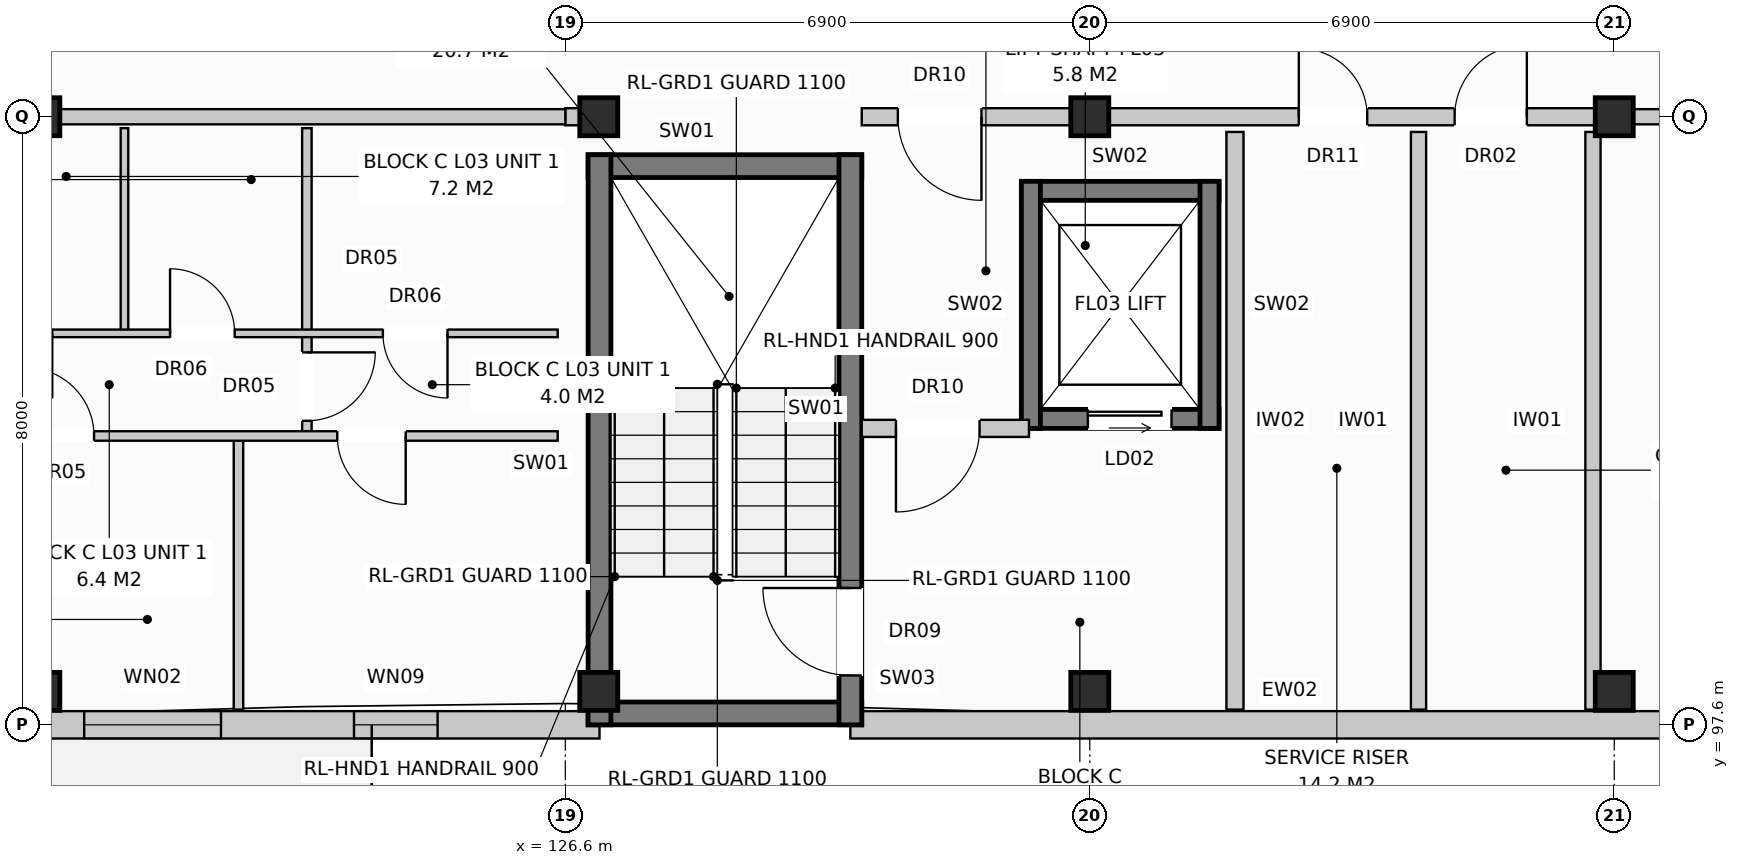
"""IFC4 building model, lengths in metres.
Left out: names, types, materials, properties, quantities, classifications, styles, units other than length and angle.
Written with IfcOpenShell. Run it as: python <this file> out.ifc"""

import sys

from ifc_helpers import new_model, si_unit, direction, frame, frame_2d, origin, origin_with_axes, origin_2d, place, context, subcontext, project, spatial, rectangle, extrude, element, fill, save


model = new_model("IFC4")
c1 = context("Model", 3, precision=1e-05, world=origin(), true_north=direction((0.0, 1.0)))
c2 = subcontext(c1, "Body", "Model", "MODEL_VIEW")
j1 = project(units=[si_unit("LENGTHUNIT", "METRE"), si_unit("PLANEANGLEUNIT", "RADIAN")], contexts=[c1])
p1 = place(None, origin())
s1 = spatial("IfcSite", under=j1, at=p1, CompositionType="ELEMENT")
p2 = place(p1, origin())
s2 = spatial("IfcBuilding", under=s1, at=p2, CompositionType="ELEMENT")
p3 = place(p2, frame((0.0, 0.0, 11.2)))
s3 = spatial("IfcBuildingStorey", under=s2, at=p3, CompositionType="ELEMENT", Elevation=11.2)
for number, where, z_axis, x_axis in (
    (1, (119.7, 98.04, 0.0), (0.0, 0.0, 1.0), (1.0, 0.0, 0.0)),
    (2, (119.7, 105.6, 0.0), (0.0, 0.0, 1.0), (1.0, 0.0, 0.0)),
    (3, (127.04, 98.04, 0.0), (0.0, 0.0, 1.0), (1.0, 0.0, 0.0)),
    (4, (127.04, 105.6, 0.0), (0.0, 0.0, 1.0), (1.0, 0.0, 0.0)),
    (5, (133.5, 98.04, 0.0), (0.0, 0.0, 1.0), (1.0, 0.0, 0.0)),
    (6, (133.5, 105.6, 0.0), (0.0, 0.0, 1.0), (1.0, 0.0, 0.0)),
    (7, (140.4, 98.04, 0.0), (0.0, 0.0, 1.0), (1.0, 0.0, 0.0)),
    (8, (140.4, 105.6, 0.0), (0.0, 0.0, 1.0), (1.0, 0.0, 0.0)),
):
    element("IfcColumn", number, at=place(p3, frame(where, z_axis=z_axis, x_axis=x_axis)), inside=s3, PredefinedType="COLUMN", context=c2, shape_type="SweptSolid", body=[
        extrude(rectangle(XDim=0.5, YDim=0.5, at=origin_2d()), origin(), (0.0, 0.0, 1.0), 3.2),
    ])
p4 = place(p3, frame((112.97, 97.6, 0.0), z_axis=(0.0, 0.0, 1.0), x_axis=(1.0, 0.0, 0.0)))
e9 = element("IfcWall", 9, at=p4, inside=s3, PredefinedType="STANDARD", context=c2, shape_type="SweptSolid", body=[
    extrude(rectangle(XDim=14.08, YDim=0.36, at=frame_2d((7.04, 0.0))), origin(), (0.0, 0.0, 1.0), 2.94),
])
p5 = place(p4, frame((3.797, 0.0, 0.0)))
e10 = element("IfcOpeningElement", 10, at=p5, cuts=e9, PredefinedType="OPENING", context=c2, shape_type="SweptSolid", body=[
    extrude(rectangle(XDim=0.95, YDim=2.1, at=frame_2d((0.475, 1.05))), frame((0.0, 0.192, 0.0), z_axis=(0.0, -1.0, 0.0), x_axis=(1.0, 0.0, 0.0)), (0.0, 0.0, 1.0), 0.384),
])
p6 = place(p4, frame((1.95, 0.0, 0.72)))
e11 = element("IfcOpeningElement", 11, at=p6, cuts=e9, PredefinedType="OPENING", context=c2, shape_type="SweptSolid", body=[
    extrude(rectangle(XDim=1.1, YDim=1.5, at=frame_2d((0.55, 0.75))), frame((0.0, 0.192, 0.0), z_axis=(0.0, -1.0, 0.0), x_axis=(1.0, 0.0, 0.0)), (0.0, 0.0, 1.0), 0.384),
])
p7 = place(p4, frame((7.3, 0.0, 0.8)))
e12 = element("IfcOpeningElement", 12, at=p7, cuts=e9, PredefinedType="OPENING", context=c2, shape_type="SweptSolid", body=[
    extrude(rectangle(XDim=1.8, YDim=1.7, at=frame_2d((0.9, 0.85))), frame((0.0, 0.192, 0.0), z_axis=(0.0, -1.0, 0.0), x_axis=(1.0, 0.0, 0.0)), (0.0, 0.0, 1.0), 0.384),
])
p8 = place(p4, frame((10.85, 0.0, 0.72)))
e13 = element("IfcOpeningElement", 13, at=p8, cuts=e9, PredefinedType="OPENING", context=c2, shape_type="SweptSolid", body=[
    extrude(rectangle(XDim=1.1, YDim=1.5, at=frame_2d((0.55, 0.75))), frame((0.0, 0.192, 0.0), z_axis=(0.0, -1.0, 0.0), x_axis=(1.0, 0.0, 0.0)), (0.0, 0.0, 1.0), 0.384),
])
p9 = place(p3, frame((130.35, 97.6, 0.0), z_axis=(0.0, 0.0, 1.0), x_axis=(1.0, 0.0, 0.0)))
e14 = element("IfcWall", 14, at=p9, inside=s3, PredefinedType="STANDARD", context=c2, shape_type="SweptSolid", body=[
    extrude(rectangle(XDim=17.4, YDim=0.36, at=frame_2d((8.7, 0.0))), origin(), (0.0, 0.0, 1.0), 2.94),
])
p10 = place(p9, frame((11.874, 0.0, 0.0)))
e15 = element("IfcOpeningElement", 15, at=p10, cuts=e14, PredefinedType="OPENING", context=c2, shape_type="SweptSolid", body=[
    extrude(rectangle(XDim=0.95, YDim=2.1, at=frame_2d((0.475, 1.05))), frame((0.0, 0.192, 0.0), z_axis=(0.0, -1.0, 0.0), x_axis=(1.0, 0.0, 0.0)), (0.0, 0.0, 1.0), 0.384),
])
p11 = place(p9, frame((14.87, 0.0, 0.72)))
e16 = element("IfcOpeningElement", 16, at=p11, cuts=e14, PredefinedType="OPENING", context=c2, shape_type="SweptSolid", body=[
    extrude(rectangle(XDim=1.1, YDim=1.5, at=frame_2d((0.55, 0.75))), frame((0.0, 0.192, 0.0), z_axis=(0.0, -1.0, 0.0), x_axis=(1.0, 0.0, 0.0)), (0.0, 0.0, 1.0), 0.384),
])
for number, where, z_axis, x_axis in (
    (17, (126.9, 97.75, 0.0), (0.0, 0.0, 1.0), (1.0, 0.0, 0.0)),
    (18, (126.9, 104.95, 0.0), (0.0, 0.0, 1.0), (1.0, 0.0, 0.0)),
):
    element("IfcWall", number, at=place(p3, frame(where, z_axis=z_axis, x_axis=x_axis)), inside=s3, PredefinedType="SHEAR", context=c2, shape_type="SweptSolid", body=[
        extrude(rectangle(XDim=3.6, YDim=0.3, at=frame_2d((1.8, 0.0))), origin(), (0.0, 0.0, 1.0), 2.94),
    ])
p12 = place(p3, frame((127.05, 97.6, 0.0), z_axis=(0.0, 0.0, 1.0), x_axis=(0.0, 1.0, 0.0)))
e19 = element("IfcWall", 19, at=p12, inside=s3, PredefinedType="SHEAR", context=c2, shape_type="SweptSolid", body=[
    extrude(rectangle(XDim=7.5, YDim=0.3, at=frame_2d((3.75, 0.0))), origin(), (0.0, 0.0, 1.0), 2.94),
])
p13 = place(p3, frame((130.35, 97.6, 0.0), z_axis=(0.0, 0.0, 1.0), x_axis=(0.0, 1.0, 0.0)))
e20 = element("IfcWall", 20, at=p13, inside=s3, PredefinedType="SHEAR", context=c2, shape_type="SweptSolid", body=[
    extrude(rectangle(XDim=7.5, YDim=0.3, at=frame_2d((3.75, 0.0))), origin(), (0.0, 0.0, 1.0), 2.94),
])
p14 = place(p13, frame((0.65, 0.0, 0.0)))
e21 = element("IfcOpeningElement", 21, at=p14, cuts=e20, PredefinedType="OPENING", context=c2, shape_type="SweptSolid", body=[
    extrude(rectangle(XDim=1.15, YDim=2.15, at=frame_2d((0.575, 1.075))), frame((0.0, 0.162, 0.0), z_axis=(0.0, -1.0, 0.0), x_axis=(1.0, 0.0, 0.0)), (0.0, 0.0, 1.0), 0.324),
])
p15 = place(p3, frame((132.6, 101.625, 0.0), z_axis=(0.0, 0.0, 1.0), x_axis=(1.0, 0.0, 0.0)))
e22 = element("IfcWall", 22, at=p15, inside=s3, PredefinedType="SHEAR", context=c2, shape_type="SweptSolid", body=[
    extrude(rectangle(XDim=2.6, YDim=0.25, at=frame_2d((1.3, 0.0))), origin(), (0.0, 0.0, 1.0), 2.94),
])
p16 = place(p15, frame((0.875, 0.0, 0.0)))
e23 = element("IfcOpeningElement", 23, at=p16, cuts=e22, PredefinedType="OPENING", context=c2, shape_type="SweptSolid", body=[
    extrude(rectangle(XDim=1.1, YDim=2.1, at=frame_2d((0.55, 1.05))), frame((0.0, 0.137, 0.0), z_axis=(0.0, -1.0, 0.0), x_axis=(1.0, 0.0, 0.0)), (0.0, 0.0, 1.0), 0.274),
])
p17 = place(p3, frame((132.6, 104.625, 0.0), z_axis=(0.0, 0.0, 1.0), x_axis=(1.0, 0.0, 0.0)))
e24 = element("IfcWall", 24, at=p17, inside=s3, PredefinedType="SHEAR", context=c2, shape_type="SweptSolid", body=[
    extrude(rectangle(XDim=2.6, YDim=0.25, at=frame_2d((1.3, 0.0))), origin(), (0.0, 0.0, 1.0), 2.94),
])
for number, where, z_axis, x_axis in (
    (25, (132.725, 101.5, 0.0), (0.0, 0.0, 1.0), (0.0, 1.0, 0.0)),
    (26, (135.075, 101.5, 0.0), (0.0, 0.0, 1.0), (0.0, 1.0, 0.0)),
):
    element("IfcWall", number, at=place(p3, frame(where, z_axis=z_axis, x_axis=x_axis)), inside=s3, PredefinedType="SHEAR", context=c2, shape_type="SweptSolid", body=[
        extrude(rectangle(XDim=3.25, YDim=0.25, at=frame_2d((1.625, 0.0))), origin(), (0.0, 0.0, 1.0), 2.94),
    ])
p18 = place(p3, frame((135.41, 97.8, 0.0), z_axis=(0.0, 0.0, 1.0), x_axis=(0.0, 1.0, 0.0)))
e27 = element("IfcWall", 27, at=p18, inside=s3, PredefinedType="PARTITIONING", context=c2, shape_type="SweptSolid", body=[
    extrude(rectangle(XDim=7.6, YDim=0.225, at=frame_2d((3.8, 0.0))), origin(), (0.0, 0.0, 1.0), 2.59),
])
p19 = place(p3, frame((130.5, 101.5, 0.0), z_axis=(0.0, 0.0, 1.0), x_axis=(1.0, 0.0, 0.0)))
e28 = element("IfcWall", 28, at=p19, inside=s3, PredefinedType="PARTITIONING", context=c2, shape_type="SweptSolid", body=[
    extrude(rectangle(XDim=2.2, YDim=0.225, at=frame_2d((1.1, 0.0))), origin(), (0.0, 0.0, 1.0), 2.94),
])
p20 = place(p19, frame((0.45, 0.0, 0.0)))
e29 = element("IfcOpeningElement", 29, at=p20, cuts=e28, PredefinedType="OPENING", context=c2, shape_type="SweptSolid", body=[
    extrude(rectangle(XDim=1.1, YDim=2.15, at=frame_2d((0.55, 1.075))), frame((0.0, 0.125, 0.0), z_axis=(0.0, -1.0, 0.0), x_axis=(1.0, 0.0, 0.0)), (0.0, 0.0, 1.0), 0.249),
])
p21 = place(p3, frame((126.6, 105.6, 0.0), z_axis=(0.0, 0.0, 1.0), x_axis=(1.0, 0.0, 0.0)))
e30 = element("IfcWall", 30, at=p21, inside=s3, PredefinedType="PARTITIONING", context=c2, shape_type="SweptSolid", body=[
    extrude(rectangle(XDim=0.3, YDim=0.225, at=frame_2d((0.15, 0.0))), origin(), (0.0, 0.0, 1.0), 2.94),
])
for number, where, z_axis, x_axis in (
    (31, (137.825, 97.8, 0.0), (0.0, 0.0, 1.0), (0.0, 1.0, 0.0)),
    (32, (140.12, 97.8, 0.0), (0.0, 0.0, 1.0), (0.0, 1.0, 0.0)),
):
    element("IfcWall", number, at=place(p3, frame(where, z_axis=z_axis, x_axis=x_axis)), inside=s3, PredefinedType="PARTITIONING", context=c2, shape_type="SweptSolid", body=[
        extrude(rectangle(XDim=7.6, YDim=0.2, at=frame_2d((3.8, 0.0))), origin(), (0.0, 0.0, 1.0), 2.94),
    ])
p22 = place(p3, frame((130.5, 105.6, 0.0), z_axis=(0.0, 0.0, 1.0), x_axis=(1.0, 0.0, 0.0)))
e33 = element("IfcWall", 33, at=p22, inside=s3, PredefinedType="PARTITIONING", context=c2, shape_type="SweptSolid", body=[
    extrude(rectangle(XDim=9.9, YDim=0.225, at=frame_2d((4.95, 0.0))), origin(), (0.0, 0.0, 1.0), 2.38),
])
p23 = place(p22, frame((0.475, 0.0, 0.0)))
e34 = element("IfcOpeningElement", 34, at=p23, cuts=e33, PredefinedType="OPENING", context=c2, shape_type="SweptSolid", body=[
    extrude(rectangle(XDim=1.1, YDim=2.15, at=frame_2d((0.55, 1.075))), frame((0.0, 0.125, 0.0), z_axis=(0.0, -1.0, 0.0), x_axis=(1.0, 0.0, 0.0)), (0.0, 0.0, 1.0), 0.249),
])
p24 = place(p22, frame((5.75, 0.0, 0.0)))
e35 = element("IfcOpeningElement", 35, at=p24, cuts=e33, PredefinedType="OPENING", context=c2, shape_type="SweptSolid", body=[
    extrude(rectangle(XDim=0.9, YDim=2.1, at=frame_2d((0.45, 1.05))), frame((0.0, 0.125, 0.0), z_axis=(0.0, -1.0, 0.0), x_axis=(1.0, 0.0, 0.0)), (0.0, 0.0, 1.0), 0.249),
])
p25 = place(p22, frame((7.8, 0.0, 0.0)))
e36 = element("IfcOpeningElement", 36, at=p25, cuts=e33, PredefinedType="OPENING", context=c2, shape_type="SweptSolid", body=[
    extrude(rectangle(XDim=0.95, YDim=2.15, at=frame_2d((0.475, 1.075))), frame((0.0, 0.125, 0.0), z_axis=(0.0, -1.0, 0.0), x_axis=(1.0, 0.0, 0.0)), (0.0, 0.0, 1.0), 0.249),
])
p26 = place(p3, frame((112.8, 105.6, 0.0), z_axis=(0.0, 0.0, 1.0), x_axis=(1.0, 0.0, 0.0)))
e37 = element("IfcWall", 37, at=p26, inside=s3, PredefinedType="PARTITIONING", context=c2, shape_type="SweptSolid", body=[
    extrude(rectangle(XDim=13.8, YDim=0.2, at=frame_2d((6.9, 0.0))), origin(), (0.0, 0.0, 1.0), 2.38),
])
p27 = place(p26, frame((2.4, 0.0, 0.0)))
e38 = element("IfcOpeningElement", 38, at=p27, cuts=e37, PredefinedType="OPENING", context=c2, shape_type="SweptSolid", body=[
    extrude(rectangle(XDim=0.95, YDim=2.15, at=frame_2d((0.475, 1.075))), frame((0.0, 0.112, 0.0), z_axis=(0.0, -1.0, 0.0), x_axis=(1.0, 0.0, 0.0)), (0.0, 0.0, 1.0), 0.224),
])
p28 = place(p3, frame((120.8, 105.45, 0.0), z_axis=(0.0, 0.0, 1.0), x_axis=(0.0, -1.0, 0.0)))
e39 = element("IfcWall", 39, at=p28, inside=s3, PredefinedType="PARTITIONING", context=c2, shape_type="SweptSolid", body=[
    extrude(rectangle(XDim=2.7, YDim=0.1, at=frame_2d((1.35, 0.0))), origin(), (0.0, 0.0, 1.0), 2.94),
])
p29 = place(p3, frame((123.2, 105.45, 0.0), z_axis=(0.0, 0.0, 1.0), x_axis=(0.0, -1.0, 0.0)))
e40 = element("IfcWall", 40, at=p29, inside=s3, PredefinedType="PARTITIONING", context=c2, shape_type="SweptSolid", body=[
    extrude(rectangle(XDim=4.05, YDim=0.125, at=frame_2d((2.025, 0.0))), origin(), (0.0, 0.0, 1.0), 2.59),
])
p30 = place(p29, frame((2.95, 0.0, 0.0)))
e41 = element("IfcOpeningElement", 41, at=p30, cuts=e40, PredefinedType="OPENING", context=c2, shape_type="SweptSolid", body=[
    extrude(rectangle(XDim=0.9, YDim=2.1, at=frame_2d((0.45, 1.05))), frame((0.0, 0.074, 0.0), z_axis=(0.0, -1.0, 0.0), x_axis=(1.0, 0.0, 0.0)), (0.0, 0.0, 1.0), 0.149),
])
p31 = place(p3, frame((122.3, 101.4, 0.0), z_axis=(0.0, 0.0, 1.0), x_axis=(0.0, -1.0, 0.0)))
e42 = element("IfcWall", 42, at=p31, inside=s3, PredefinedType="PARTITIONING", context=c2, shape_type="SweptSolid", body=[
    extrude(rectangle(XDim=3.6, YDim=0.125, at=frame_2d((1.8, 0.0))), origin(), (0.0, 0.0, 1.0), 2.94),
])
p32 = place(p3, frame((118.0, 102.75, 0.0), z_axis=(0.0, 0.0, 1.0), x_axis=(1.0, 0.0, 0.0)))
e43 = element("IfcWall", 43, at=p32, inside=s3, PredefinedType="PARTITIONING", context=c2, shape_type="SweptSolid", body=[
    extrude(rectangle(XDim=8.5, YDim=0.1, at=frame_2d((4.25, 0.0))), origin(), (0.0, 0.0, 1.0), 2.94),
])
p33 = place(p32, frame((1.0, 0.0, 0.0)))
e44 = element("IfcOpeningElement", 44, at=p33, cuts=e43, PredefinedType="OPENING", context=c2, shape_type="SweptSolid", body=[
    extrude(rectangle(XDim=0.85, YDim=2.1, at=frame_2d((0.425, 1.05))), frame((0.0, 0.062, 0.0), z_axis=(0.0, -1.0, 0.0), x_axis=(1.0, 0.0, 0.0)), (0.0, 0.0, 1.0), 0.124),
])
p34 = place(p32, frame((3.4, 0.0, 0.0)))
e45 = element("IfcOpeningElement", 45, at=p34, cuts=e43, PredefinedType="OPENING", context=c2, shape_type="SweptSolid", body=[
    extrude(rectangle(XDim=0.85, YDim=2.05, at=frame_2d((0.425, 1.025))), frame((0.0, 0.062, 0.0), z_axis=(0.0, -1.0, 0.0), x_axis=(1.0, 0.0, 0.0)), (0.0, 0.0, 1.0), 0.124),
])
p35 = place(p32, frame((6.2, 0.0, 0.0)))
e46 = element("IfcOpeningElement", 46, at=p35, cuts=e43, PredefinedType="OPENING", context=c2, shape_type="SweptSolid", body=[
    extrude(rectangle(XDim=0.85, YDim=2.05, at=frame_2d((0.425, 1.025))), frame((0.0, 0.062, 0.0), z_axis=(0.0, -1.0, 0.0), x_axis=(1.0, 0.0, 0.0)), (0.0, 0.0, 1.0), 0.124),
])
p36 = place(p3, frame((118.0, 101.4, 0.0), z_axis=(0.0, 0.0, 1.0), x_axis=(1.0, 0.0, 0.0)))
e47 = element("IfcWall", 47, at=p36, inside=s3, PredefinedType="PARTITIONING", context=c2, shape_type="SweptSolid", body=[
    extrude(rectangle(XDim=8.5, YDim=0.125, at=frame_2d((4.25, 0.0))), origin(), (0.0, 0.0, 1.0), 2.94),
])
p37 = place(p36, frame((1.5, 0.0, 0.0)))
e48 = element("IfcOpeningElement", 48, at=p37, cuts=e47, PredefinedType="OPENING", context=c2, shape_type="SweptSolid", body=[
    extrude(rectangle(XDim=0.9, YDim=2.1, at=frame_2d((0.45, 1.05))), frame((0.0, 0.074, 0.0), z_axis=(0.0, -1.0, 0.0), x_axis=(1.0, 0.0, 0.0)), (0.0, 0.0, 1.0), 0.149),
])
p38 = place(p36, frame((5.6, 0.0, 0.0)))
e49 = element("IfcOpeningElement", 49, at=p38, cuts=e47, PredefinedType="OPENING", context=c2, shape_type="SweptSolid", body=[
    extrude(rectangle(XDim=0.9, YDim=2.1, at=frame_2d((0.45, 1.05))), frame((0.0, 0.074, 0.0), z_axis=(0.0, -1.0, 0.0), x_axis=(1.0, 0.0, 0.0)), (0.0, 0.0, 1.0), 0.149),
])
p39 = place(p3, frame((140.4, 105.6, 0.0), z_axis=(0.0, 0.0, 1.0), x_axis=(1.0, 0.0, 0.0)))
e50 = element("IfcWall", 50, at=p39, inside=s3, PredefinedType="PARTITIONING", context=c2, shape_type="SweptSolid", body=[
    extrude(rectangle(XDim=6.9, YDim=0.2, at=frame_2d((3.45, 0.0))), origin(), (0.0, 0.0, 1.0), 2.38),
])
p40 = place(p39, frame((2.0, 0.0, 0.0)))
e51 = element("IfcOpeningElement", 51, at=p40, cuts=e50, PredefinedType="OPENING", context=c2, shape_type="SweptSolid", body=[
    extrude(rectangle(XDim=0.95, YDim=2.15, at=frame_2d((0.475, 1.075))), frame((0.0, 0.112, 0.0), z_axis=(0.0, -1.0, 0.0), x_axis=(1.0, 0.0, 0.0)), (0.0, 0.0, 1.0), 0.224),
])
p41 = place(p7, origin_with_axes())
e52 = element("IfcWindow", 52, at=p41, inside=s3, PartitioningType="SINGLE_PANEL", PredefinedType="WINDOW", context=c2, shape_type="SweptSolid", body=[
    extrude(rectangle(XDim=1.8, YDim=1.7, at=frame_2d((0.9, 0.85))), frame((0.0, 0.03, 0.0), z_axis=(0.0, -1.0, 0.0), x_axis=(1.0, 0.0, 0.0)), (0.0, 0.0, 1.0), 0.06),
])
fill(e12, e52)
p42 = place(p8, origin_with_axes())
e53 = element("IfcWindow", 53, at=p42, inside=s3, PartitioningType="SINGLE_PANEL", PredefinedType="WINDOW", context=c2, shape_type="SweptSolid", body=[
    extrude(rectangle(XDim=1.1, YDim=1.5, at=frame_2d((0.55, 0.75))), frame((0.0, 0.03, 0.0), z_axis=(0.0, -1.0, 0.0), x_axis=(1.0, 0.0, 0.0)), (0.0, 0.0, 1.0), 0.06),
])
fill(e13, e53)
p43 = place(p14, origin_with_axes())
e54 = element("IfcDoor", 54, at=p43, inside=s3, OperationType="SINGLE_SWING_RIGHT", PredefinedType="DOOR", context=c2, shape_type="SweptSolid", body=[
    extrude(rectangle(XDim=1.15, YDim=2.15, at=frame_2d((0.575, 1.075))), frame((0.0, 0.025, 0.0), z_axis=(0.0, -1.0, 0.0), x_axis=(1.0, 0.0, 0.0)), (0.0, 0.0, 1.0), 0.05),
])
fill(e21, e54)
p44 = place(p16, origin_with_axes())
e55 = element("IfcDoor", 55, at=p44, inside=s3, OperationType="SLIDING_TO_LEFT", PredefinedType="DOOR", context=c2, shape_type="SweptSolid", body=[
    extrude(rectangle(XDim=1.1, YDim=2.1, at=frame_2d((0.55, 1.05))), frame((0.0, 0.025, 0.0), z_axis=(0.0, -1.0, 0.0), x_axis=(1.0, 0.0, 0.0)), (0.0, 0.0, 1.0), 0.05),
])
fill(e23, e55)
p45 = place(p20, frame((1.1, 0.0, 0.0), z_axis=(0.0, 0.0, 1.0), x_axis=(-1.0, 0.0, 0.0)))
e56 = element("IfcDoor", 56, at=p45, inside=s3, OperationType="SINGLE_SWING_LEFT", PredefinedType="DOOR", context=c2, shape_type="SweptSolid", body=[
    extrude(rectangle(XDim=1.1, YDim=2.15, at=frame_2d((0.55, 1.075))), frame((0.0, 0.025, 0.0), z_axis=(0.0, -1.0, 0.0), x_axis=(1.0, 0.0, 0.0)), (0.0, 0.0, 1.0), 0.05),
])
fill(e29, e56)
p46 = place(p23, frame((1.1, 0.0, 0.0), z_axis=(0.0, 0.0, 1.0), x_axis=(-1.0, 0.0, 0.0)))
e57 = element("IfcDoor", 57, at=p46, inside=s3, OperationType="SINGLE_SWING_RIGHT", PredefinedType="DOOR", context=c2, shape_type="SweptSolid", body=[
    extrude(rectangle(XDim=1.1, YDim=2.15, at=frame_2d((0.55, 1.075))), frame((0.0, 0.025, 0.0), z_axis=(0.0, -1.0, 0.0), x_axis=(1.0, 0.0, 0.0)), (0.0, 0.0, 1.0), 0.05),
])
fill(e34, e57)
p47 = place(p24, origin_with_axes())
e58 = element("IfcDoor", 58, at=p47, inside=s3, OperationType="SINGLE_SWING_LEFT", PredefinedType="DOOR", context=c2, shape_type="SweptSolid", body=[
    extrude(rectangle(XDim=0.9, YDim=2.1, at=frame_2d((0.45, 1.05))), frame((0.0, 0.025, 0.0), z_axis=(0.0, -1.0, 0.0), x_axis=(1.0, 0.0, 0.0)), (0.0, 0.0, 1.0), 0.05),
])
fill(e35, e58)
p48 = place(p25, origin_with_axes())
e59 = element("IfcDoor", 59, at=p48, inside=s3, OperationType="SINGLE_SWING_RIGHT", PredefinedType="DOOR", context=c2, shape_type="SweptSolid", body=[
    extrude(rectangle(XDim=0.95, YDim=2.15, at=frame_2d((0.475, 1.075))), frame((0.0, 0.025, 0.0), z_axis=(0.0, -1.0, 0.0), x_axis=(1.0, 0.0, 0.0)), (0.0, 0.0, 1.0), 0.05),
])
fill(e36, e59)
p49 = place(p30, origin_with_axes())
e60 = element("IfcDoor", 60, at=p49, inside=s3, OperationType="SINGLE_SWING_LEFT", PredefinedType="DOOR", context=c2, shape_type="SweptSolid", body=[
    extrude(rectangle(XDim=0.9, YDim=2.1, at=frame_2d((0.45, 1.05))), frame((0.0, 0.025, 0.0), z_axis=(0.0, -1.0, 0.0), x_axis=(1.0, 0.0, 0.0)), (0.0, 0.0, 1.0), 0.05),
])
fill(e41, e60)
p50 = place(p34, origin_with_axes())
e61 = element("IfcDoor", 61, at=p50, inside=s3, OperationType="SINGLE_SWING_LEFT", PredefinedType="DOOR", context=c2, shape_type="SweptSolid", body=[
    extrude(rectangle(XDim=0.85, YDim=2.05, at=frame_2d((0.425, 1.025))), frame((0.0, 0.025, 0.0), z_axis=(0.0, -1.0, 0.0), x_axis=(1.0, 0.0, 0.0)), (0.0, 0.0, 1.0), 0.05),
])
fill(e45, e61)
p51 = place(p35, frame((0.85, 0.0, 0.0), z_axis=(0.0, 0.0, 1.0), x_axis=(-1.0, 0.0, 0.0)))
e62 = element("IfcDoor", 62, at=p51, inside=s3, OperationType="SINGLE_SWING_RIGHT", PredefinedType="DOOR", context=c2, shape_type="SweptSolid", body=[
    extrude(rectangle(XDim=0.85, YDim=2.05, at=frame_2d((0.425, 1.025))), frame((0.0, 0.025, 0.0), z_axis=(0.0, -1.0, 0.0), x_axis=(1.0, 0.0, 0.0)), (0.0, 0.0, 1.0), 0.05),
])
fill(e46, e62)
p52 = place(p37, origin_with_axes())
e63 = element("IfcDoor", 63, at=p52, inside=s3, OperationType="SINGLE_SWING_LEFT", PredefinedType="DOOR", context=c2, shape_type="SweptSolid", body=[
    extrude(rectangle(XDim=0.9, YDim=2.1, at=frame_2d((0.45, 1.05))), frame((0.0, 0.025, 0.0), z_axis=(0.0, -1.0, 0.0), x_axis=(1.0, 0.0, 0.0)), (0.0, 0.0, 1.0), 0.05),
])
fill(e48, e63)
p53 = place(p38, frame((0.9, 0.0, 0.0), z_axis=(0.0, 0.0, 1.0), x_axis=(-1.0, 0.0, 0.0)))
e64 = element("IfcDoor", 64, at=p53, inside=s3, OperationType="SINGLE_SWING_RIGHT", PredefinedType="DOOR", context=c2, shape_type="SweptSolid", body=[
    extrude(rectangle(XDim=0.9, YDim=2.1, at=frame_2d((0.45, 1.05))), frame((0.0, 0.025, 0.0), z_axis=(0.0, -1.0, 0.0), x_axis=(1.0, 0.0, 0.0)), (0.0, 0.0, 1.0), 0.05),
])
fill(e49, e64)
save(model, sys.argv[1])
